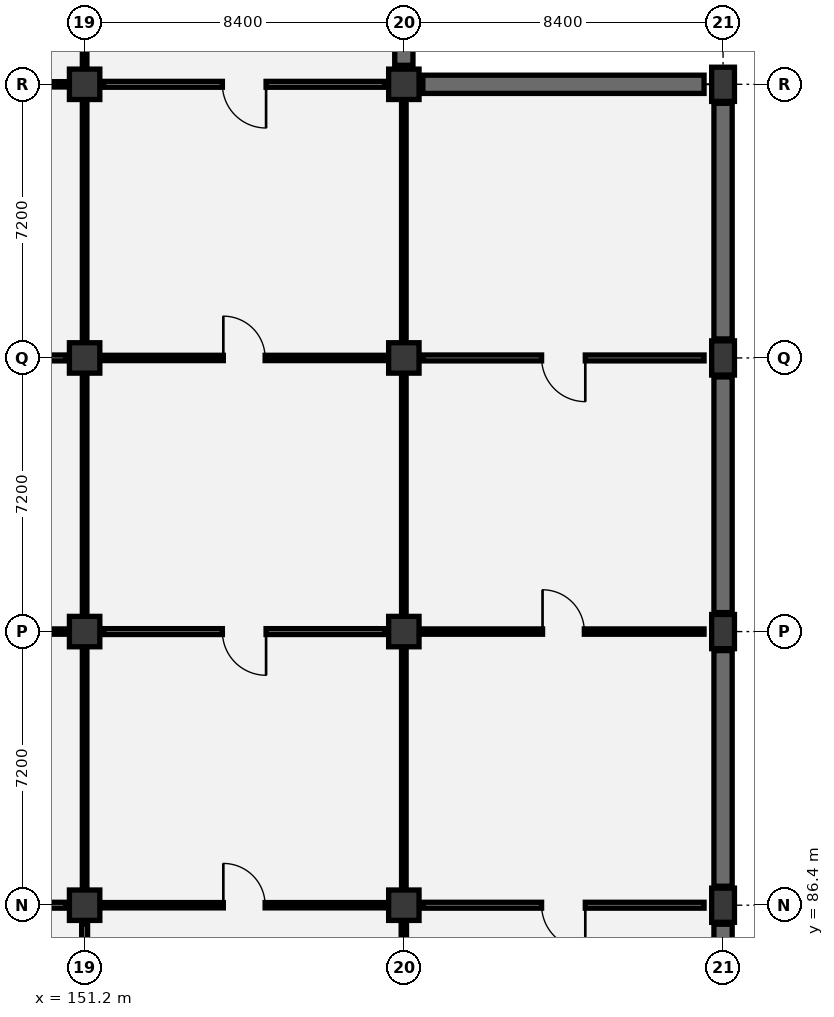
"""IFC4 building model, lengths in metres.
Left out: names, types, materials, properties, quantities, classifications, styles, units other than length and angle.
Written with IfcOpenShell. Run it as: python <this file> out.ifc"""

import sys

from ifc_helpers import new_model, si_unit, direction, frame, frame_2d, origin, origin_2d, place, context, subcontext, project, spatial, rectangle, extrude, element, fill, save


model = new_model("IFC4")
c1 = context("Model", 3, precision=1e-05, world=origin(), true_north=direction((0.0, 1.0)))
c2 = subcontext(c1, "Body", "Model", "MODEL_VIEW")
j1 = project(units=[si_unit("LENGTHUNIT", "METRE"), si_unit("PLANEANGLEUNIT", "RADIAN")], contexts=[c1])
p1 = place(None, origin())
s1 = spatial("IfcSite", under=j1, at=p1, CompositionType="ELEMENT")
p2 = place(p1, origin())
s2 = spatial("IfcBuilding", under=s1, at=p2, CompositionType="ELEMENT")
p3 = place(p2, frame((0.0, 0.0, -4.8)))
s3 = spatial("IfcBuildingStorey", under=s2, at=p3, CompositionType="ELEMENT", Elevation=-4.8)
for number, where, z_axis, x_axis in (
    (1, (151.2, 86.4, 0.0), (0.0, 0.0, 1.0), (1.0, 0.0, 0.0)),
    (2, (151.2, 93.6, 0.0), (0.0, 0.0, 1.0), (1.0, 0.0, 0.0)),
    (3, (151.2, 100.8, 0.0), (0.0, 0.0, 1.0), (1.0, 0.0, 0.0)),
    (4, (151.2, 108.0, 0.0), (0.0, 0.0, 1.0), (1.0, 0.0, 0.0)),
    (5, (159.6, 86.4, 0.0), (0.0, 0.0, 1.0), (1.0, 0.0, 0.0)),
    (6, (159.6, 93.6, 0.0), (0.0, 0.0, 1.0), (1.0, 0.0, 0.0)),
    (7, (159.6, 100.8, 0.0), (0.0, 0.0, 1.0), (1.0, 0.0, 0.0)),
    (8, (159.6, 108.0, 0.0), (0.0, 0.0, 1.0), (1.0, 0.0, 0.0)),
):
    element("IfcColumn", number, at=place(p3, frame(where, z_axis=z_axis, x_axis=x_axis)), inside=s3, PredefinedType="COLUMN", context=c2, shape_type="SweptSolid", body=[
        extrude(rectangle(XDim=0.8, YDim=0.8, at=origin_2d()), origin(), (0.0, 0.0, 1.0), 4.8),
    ])
for number, where, z_axis, x_axis in (
    (9, (168.0, 86.4, 0.0), (0.0, 0.0, 1.0), (1.0, 0.0, 0.0)),
    (10, (168.0, 93.6, 0.0), (0.0, 0.0, 1.0), (1.0, 0.0, 0.0)),
    (11, (168.0, 100.8, 0.0), (0.0, 0.0, 1.0), (1.0, 0.0, 0.0)),
    (12, (168.0, 108.0, 0.0), (0.0, 0.0, 1.0), (1.0, 0.0, 0.0)),
):
    element("IfcColumn", number, at=place(p3, frame(where, z_axis=z_axis, x_axis=x_axis)), inside=s3, PredefinedType="COLUMN", context=c2, shape_type="SweptSolid", body=[
        extrude(rectangle(XDim=0.6, YDim=0.9, at=origin_2d()), origin(), (0.0, 0.0, 1.0), 4.8),
    ])
for number, where, z_axis, x_axis in (
    (13, (159.6, 108.5, 0.0), (0.0, 0.0, 1.0), (0.0, 1.0, 0.0)),
    (14, (168.0, 79.7, 0.0), (0.0, 0.0, 1.0), (0.0, 1.0, 0.0)),
):
    element("IfcWall", number, at=place(p3, frame(where, z_axis=z_axis, x_axis=x_axis)), inside=s3, PredefinedType="USERDEFINED", context=c2, shape_type="SweptSolid", body=[
        extrude(rectangle(XDim=6.2, YDim=0.48, at=frame_2d((3.1, 0.0))), origin(), (0.0, 0.0, 1.0), 4.45),
    ])
p4 = place(p3, frame((168.0, 86.9, 0.0), z_axis=(0.0, 0.0, 1.0), x_axis=(0.0, 1.0, 0.0)))
e15 = element("IfcWall", 15, at=p4, inside=s3, PredefinedType="USERDEFINED", context=c2, shape_type="SweptSolid", body=[
    extrude(rectangle(XDim=6.2, YDim=0.48, at=frame_2d((3.1, 0.0))), origin(), (0.0, 0.0, 1.0), 4.45),
])
p5 = place(p3, frame((168.0, 94.1, 0.0), z_axis=(0.0, 0.0, 1.0), x_axis=(0.0, 1.0, 0.0)))
e16 = element("IfcWall", 16, at=p5, inside=s3, PredefinedType="USERDEFINED", context=c2, shape_type="SweptSolid", body=[
    extrude(rectangle(XDim=6.2, YDim=0.48, at=frame_2d((3.1, 0.0))), origin(), (0.0, 0.0, 1.0), 4.45),
])
p6 = place(p3, frame((160.1, 108.0, 0.0), z_axis=(0.0, 0.0, 1.0), x_axis=(1.0, 0.0, 0.0)))
e17 = element("IfcWall", 17, at=p6, inside=s3, PredefinedType="USERDEFINED", context=c2, shape_type="SweptSolid", body=[
    extrude(rectangle(XDim=7.4, YDim=0.48, at=frame_2d((3.7, 0.0))), origin(), (0.0, 0.0, 1.0), 4.45),
])
p7 = place(p3, frame((168.0, 101.3, 0.0), z_axis=(0.0, 0.0, 1.0), x_axis=(0.0, 1.0, 0.0)))
e18 = element("IfcWall", 18, at=p7, inside=s3, PredefinedType="USERDEFINED", context=c2, shape_type="SweptSolid", body=[
    extrude(rectangle(XDim=6.2, YDim=0.48, at=frame_2d((3.1, 0.0))), origin(), (0.0, 0.0, 1.0), 4.45),
])
p8 = place(p3, frame((168.0, 108.12, 0.0), z_axis=(0.0, 0.0, 1.0), x_axis=(0.0, 1.0, 0.0)))
e19 = element("IfcWall", 19, at=p8, inside=s3, PredefinedType="PARAPET", context=c2, shape_type="SweptSolid", body=[
    extrude(rectangle(XDim=6.96, YDim=0.22, at=frame_2d((3.48, 0.0))), origin(), (0.0, 0.0, 1.0), 1.15),
])
p9 = place(p3, frame((151.2, 79.7, 0.0), z_axis=(0.0, 0.0, 1.0), x_axis=(0.0, 1.0, 0.0)))
e20 = element("IfcWall", 20, at=p9, inside=s3, PredefinedType="PARTITIONING", context=c2, shape_type="SweptSolid", body=[
    extrude(rectangle(XDim=6.2, YDim=0.155, at=frame_2d((3.1, 0.0))), origin(), (0.0, 0.0, 1.0), 3.645),
])
p10 = place(p9, frame((2.525, 0.0, 0.0)))
e21 = element("IfcOpeningElement", 21, at=p10, cuts=e20, PredefinedType="OPENING", context=c2, shape_type="SweptSolid", body=[
    extrude(rectangle(XDim=1.15, YDim=2.1, at=frame_2d((0.575, 1.05))), frame((0.0, 0.087, 0.0), z_axis=(0.0, -1.0, 0.0), x_axis=(1.0, 0.0, 0.0)), (0.0, 0.0, 1.0), 0.175),
])
p11 = place(p3, frame((143.3, 86.4, 0.0), z_axis=(0.0, 0.0, 1.0), x_axis=(1.0, 0.0, 0.0)))
e22 = element("IfcWall", 22, at=p11, inside=s3, PredefinedType="PARTITIONING", context=c2, shape_type="SweptSolid", body=[
    extrude(rectangle(XDim=7.4, YDim=0.155, at=frame_2d((3.7, 0.0))), origin(), (0.0, 0.0, 1.0), 3.545),
])
p12 = place(p11, frame((3.15, 0.0, 0.0)))
e23 = element("IfcOpeningElement", 23, at=p12, cuts=e22, PredefinedType="OPENING", context=c2, shape_type="SweptSolid", body=[
    extrude(rectangle(XDim=1.1, YDim=2.1, at=frame_2d((0.55, 1.05))), frame((0.0, 0.087, 0.0), z_axis=(0.0, -1.0, 0.0), x_axis=(1.0, 0.0, 0.0)), (0.0, 0.0, 1.0), 0.175),
])
p13 = place(p3, frame((151.2, 86.9, 0.0), z_axis=(0.0, 0.0, 1.0), x_axis=(0.0, 1.0, 0.0)))
e24 = element("IfcWall", 24, at=p13, inside=s3, PredefinedType="PARTITIONING", context=c2, shape_type="SweptSolid", body=[
    extrude(rectangle(XDim=6.2, YDim=0.12, at=frame_2d((3.1, 0.0))), origin(), (0.0, 0.0, 1.0), 3.645),
])
p14 = place(p3, frame((143.3, 93.6, 0.0), z_axis=(0.0, 0.0, 1.0), x_axis=(1.0, 0.0, 0.0)))
e25 = element("IfcWall", 25, at=p14, inside=s3, PredefinedType="PARTITIONING", context=c2, shape_type="SweptSolid", body=[
    extrude(rectangle(XDim=7.4, YDim=0.14, at=frame_2d((3.7, 0.0))), origin(), (0.0, 0.0, 1.0), 3.545),
])
p15 = place(p14, frame((3.125, 0.0, 0.0)))
e26 = element("IfcOpeningElement", 26, at=p15, cuts=e25, PredefinedType="OPENING", context=c2, shape_type="SweptSolid", body=[
    extrude(rectangle(XDim=1.15, YDim=2.1, at=frame_2d((0.575, 1.05))), frame((0.0, 0.08, 0.0), z_axis=(0.0, -1.0, 0.0), x_axis=(1.0, 0.0, 0.0)), (0.0, 0.0, 1.0), 0.16),
])
p16 = place(p3, frame((151.2, 94.1, 0.0), z_axis=(0.0, 0.0, 1.0), x_axis=(0.0, 1.0, 0.0)))
e27 = element("IfcWall", 27, at=p16, inside=s3, PredefinedType="PARTITIONING", context=c2, shape_type="SweptSolid", body=[
    extrude(rectangle(XDim=6.2, YDim=0.12, at=frame_2d((3.1, 0.0))), origin(), (0.0, 0.0, 1.0), 3.645),
])
p17 = place(p3, frame((143.3, 100.8, 0.0), z_axis=(0.0, 0.0, 1.0), x_axis=(1.0, 0.0, 0.0)))
e28 = element("IfcWall", 28, at=p17, inside=s3, PredefinedType="PARTITIONING", context=c2, shape_type="SweptSolid", body=[
    extrude(rectangle(XDim=7.4, YDim=0.155, at=frame_2d((3.7, 0.0))), origin(), (0.0, 0.0, 1.0), 3.545),
])
p18 = place(p17, frame((3.15, 0.0, 0.0)))
e29 = element("IfcOpeningElement", 29, at=p18, cuts=e28, PredefinedType="OPENING", context=c2, shape_type="SweptSolid", body=[
    extrude(rectangle(XDim=1.1, YDim=2.1, at=frame_2d((0.55, 1.05))), frame((0.0, 0.087, 0.0), z_axis=(0.0, -1.0, 0.0), x_axis=(1.0, 0.0, 0.0)), (0.0, 0.0, 1.0), 0.175),
])
p19 = place(p3, frame((151.2, 101.3, 0.0), z_axis=(0.0, 0.0, 1.0), x_axis=(0.0, 1.0, 0.0)))
e30 = element("IfcWall", 30, at=p19, inside=s3, PredefinedType="PARTITIONING", context=c2, shape_type="SweptSolid", body=[
    extrude(rectangle(XDim=6.2, YDim=0.12, at=frame_2d((3.1, 0.0))), origin(), (0.0, 0.0, 1.0), 3.645),
])
p20 = place(p3, frame((143.3, 108.0, 0.0), z_axis=(0.0, 0.0, 1.0), x_axis=(1.0, 0.0, 0.0)))
e31 = element("IfcWall", 31, at=p20, inside=s3, PredefinedType="PARTITIONING", context=c2, shape_type="SweptSolid", body=[
    extrude(rectangle(XDim=7.4, YDim=0.14, at=frame_2d((3.7, 0.0))), origin(), (0.0, 0.0, 1.0), 3.545),
])
p21 = place(p20, frame((3.125, 0.0, 0.0)))
e32 = element("IfcOpeningElement", 32, at=p21, cuts=e31, PredefinedType="OPENING", context=c2, shape_type="SweptSolid", body=[
    extrude(rectangle(XDim=1.15, YDim=2.1, at=frame_2d((0.575, 1.05))), frame((0.0, 0.08, 0.0), z_axis=(0.0, -1.0, 0.0), x_axis=(1.0, 0.0, 0.0)), (0.0, 0.0, 1.0), 0.16),
])
p22 = place(p3, frame((151.2, 108.5, 0.0), z_axis=(0.0, 0.0, 1.0), x_axis=(0.0, 1.0, 0.0)))
e33 = element("IfcWall", 33, at=p22, inside=s3, PredefinedType="PARTITIONING", context=c2, shape_type="SweptSolid", body=[
    extrude(rectangle(XDim=6.2, YDim=0.12, at=frame_2d((3.1, 0.0))), origin(), (0.0, 0.0, 1.0), 3.645),
])
p23 = place(p3, frame((159.6, 79.7, 0.0), z_axis=(0.0, 0.0, 1.0), x_axis=(0.0, 1.0, 0.0)))
e34 = element("IfcWall", 34, at=p23, inside=s3, PredefinedType="PARTITIONING", context=c2, shape_type="SweptSolid", body=[
    extrude(rectangle(XDim=6.2, YDim=0.14, at=frame_2d((3.1, 0.0))), origin(), (0.0, 0.0, 1.0), 3.645),
])
p24 = place(p23, frame((2.525, 0.0, 0.0)))
e35 = element("IfcOpeningElement", 35, at=p24, cuts=e34, PredefinedType="OPENING", context=c2, shape_type="SweptSolid", body=[
    extrude(rectangle(XDim=1.15, YDim=2.1, at=frame_2d((0.575, 1.05))), frame((0.0, 0.08, 0.0), z_axis=(0.0, -1.0, 0.0), x_axis=(1.0, 0.0, 0.0)), (0.0, 0.0, 1.0), 0.16),
])
p25 = place(p3, frame((151.7, 86.4, 0.0), z_axis=(0.0, 0.0, 1.0), x_axis=(1.0, 0.0, 0.0)))
e36 = element("IfcWall", 36, at=p25, inside=s3, PredefinedType="PARTITIONING", context=c2, shape_type="SweptSolid", body=[
    extrude(rectangle(XDim=7.4, YDim=0.14, at=frame_2d((3.7, 0.0))), origin(), (0.0, 0.0, 1.0), 3.545),
])
p26 = place(p25, frame((3.15, 0.0, 0.0)))
e37 = element("IfcOpeningElement", 37, at=p26, cuts=e36, PredefinedType="OPENING", context=c2, shape_type="SweptSolid", body=[
    extrude(rectangle(XDim=1.1, YDim=2.1, at=frame_2d((0.55, 1.05))), frame((0.0, 0.08, 0.0), z_axis=(0.0, -1.0, 0.0), x_axis=(1.0, 0.0, 0.0)), (0.0, 0.0, 1.0), 0.16),
])
p27 = place(p3, frame((159.6, 86.9, 0.0), z_axis=(0.0, 0.0, 1.0), x_axis=(0.0, 1.0, 0.0)))
e38 = element("IfcWall", 38, at=p27, inside=s3, PredefinedType="PARTITIONING", context=c2, shape_type="SweptSolid", body=[
    extrude(rectangle(XDim=6.2, YDim=0.12, at=frame_2d((3.1, 0.0))), origin(), (0.0, 0.0, 1.0), 3.645),
])
p28 = place(p3, frame((151.7, 93.6, 0.0), z_axis=(0.0, 0.0, 1.0), x_axis=(1.0, 0.0, 0.0)))
e39 = element("IfcWall", 39, at=p28, inside=s3, PredefinedType="PARTITIONING", context=c2, shape_type="SweptSolid", body=[
    extrude(rectangle(XDim=7.4, YDim=0.155, at=frame_2d((3.7, 0.0))), origin(), (0.0, 0.0, 1.0), 3.545),
])
p29 = place(p28, frame((3.125, 0.0, 0.0)))
e40 = element("IfcOpeningElement", 40, at=p29, cuts=e39, PredefinedType="OPENING", context=c2, shape_type="SweptSolid", body=[
    extrude(rectangle(XDim=1.15, YDim=2.1, at=frame_2d((0.575, 1.05))), frame((0.0, 0.087, 0.0), z_axis=(0.0, -1.0, 0.0), x_axis=(1.0, 0.0, 0.0)), (0.0, 0.0, 1.0), 0.175),
])
p30 = place(p3, frame((159.6, 94.1, 0.0), z_axis=(0.0, 0.0, 1.0), x_axis=(0.0, 1.0, 0.0)))
e41 = element("IfcWall", 41, at=p30, inside=s3, PredefinedType="PARTITIONING", context=c2, shape_type="SweptSolid", body=[
    extrude(rectangle(XDim=6.2, YDim=0.12, at=frame_2d((3.1, 0.0))), origin(), (0.0, 0.0, 1.0), 3.645),
])
p31 = place(p3, frame((151.7, 100.8, 0.0), z_axis=(0.0, 0.0, 1.0), x_axis=(1.0, 0.0, 0.0)))
e42 = element("IfcWall", 42, at=p31, inside=s3, PredefinedType="PARTITIONING", context=c2, shape_type="SweptSolid", body=[
    extrude(rectangle(XDim=7.4, YDim=0.14, at=frame_2d((3.7, 0.0))), origin(), (0.0, 0.0, 1.0), 3.545),
])
p32 = place(p31, frame((3.15, 0.0, 0.0)))
e43 = element("IfcOpeningElement", 43, at=p32, cuts=e42, PredefinedType="OPENING", context=c2, shape_type="SweptSolid", body=[
    extrude(rectangle(XDim=1.1, YDim=2.1, at=frame_2d((0.55, 1.05))), frame((0.0, 0.08, 0.0), z_axis=(0.0, -1.0, 0.0), x_axis=(1.0, 0.0, 0.0)), (0.0, 0.0, 1.0), 0.16),
])
p33 = place(p3, frame((159.6, 101.3, 0.0), z_axis=(0.0, 0.0, 1.0), x_axis=(0.0, 1.0, 0.0)))
e44 = element("IfcWall", 44, at=p33, inside=s3, PredefinedType="PARTITIONING", context=c2, shape_type="SweptSolid", body=[
    extrude(rectangle(XDim=6.2, YDim=0.12, at=frame_2d((3.1, 0.0))), origin(), (0.0, 0.0, 1.0), 3.645),
])
p34 = place(p3, frame((151.7, 108.0, 0.0), z_axis=(0.0, 0.0, 1.0), x_axis=(1.0, 0.0, 0.0)))
e45 = element("IfcWall", 45, at=p34, inside=s3, PredefinedType="PARTITIONING", context=c2, shape_type="SweptSolid", body=[
    extrude(rectangle(XDim=7.4, YDim=0.155, at=frame_2d((3.7, 0.0))), origin(), (0.0, 0.0, 1.0), 3.545),
])
p35 = place(p34, frame((3.125, 0.0, 0.0)))
e46 = element("IfcOpeningElement", 46, at=p35, cuts=e45, PredefinedType="OPENING", context=c2, shape_type="SweptSolid", body=[
    extrude(rectangle(XDim=1.15, YDim=2.1, at=frame_2d((0.575, 1.05))), frame((0.0, 0.087, 0.0), z_axis=(0.0, -1.0, 0.0), x_axis=(1.0, 0.0, 0.0)), (0.0, 0.0, 1.0), 0.175),
])
p36 = place(p3, frame((160.1, 86.4, 0.0), z_axis=(0.0, 0.0, 1.0), x_axis=(1.0, 0.0, 0.0)))
e47 = element("IfcWall", 47, at=p36, inside=s3, PredefinedType="PARTITIONING", context=c2, shape_type="SweptSolid", body=[
    extrude(rectangle(XDim=7.4, YDim=0.155, at=frame_2d((3.7, 0.0))), origin(), (0.0, 0.0, 1.0), 3.545),
])
p37 = place(p36, frame((3.125, 0.0, 0.0)))
e48 = element("IfcOpeningElement", 48, at=p37, cuts=e47, PredefinedType="OPENING", context=c2, shape_type="SweptSolid", body=[
    extrude(rectangle(XDim=1.15, YDim=2.1, at=frame_2d((0.575, 1.05))), frame((0.0, 0.087, 0.0), z_axis=(0.0, -1.0, 0.0), x_axis=(1.0, 0.0, 0.0)), (0.0, 0.0, 1.0), 0.175),
])
p38 = place(p3, frame((160.1, 93.6, 0.0), z_axis=(0.0, 0.0, 1.0), x_axis=(1.0, 0.0, 0.0)))
e49 = element("IfcWall", 49, at=p38, inside=s3, PredefinedType="PARTITIONING", context=c2, shape_type="SweptSolid", body=[
    extrude(rectangle(XDim=7.4, YDim=0.14, at=frame_2d((3.7, 0.0))), origin(), (0.0, 0.0, 1.0), 3.545),
])
p39 = place(p38, frame((3.15, 0.0, 0.0)))
e50 = element("IfcOpeningElement", 50, at=p39, cuts=e49, PredefinedType="OPENING", context=c2, shape_type="SweptSolid", body=[
    extrude(rectangle(XDim=1.1, YDim=2.1, at=frame_2d((0.55, 1.05))), frame((0.0, 0.08, 0.0), z_axis=(0.0, -1.0, 0.0), x_axis=(1.0, 0.0, 0.0)), (0.0, 0.0, 1.0), 0.16),
])
p40 = place(p3, frame((160.1, 100.8, 0.0), z_axis=(0.0, 0.0, 1.0), x_axis=(1.0, 0.0, 0.0)))
e51 = element("IfcWall", 51, at=p40, inside=s3, PredefinedType="PARTITIONING", context=c2, shape_type="SweptSolid", body=[
    extrude(rectangle(XDim=7.4, YDim=0.155, at=frame_2d((3.7, 0.0))), origin(), (0.0, 0.0, 1.0), 3.545),
])
p41 = place(p40, frame((3.125, 0.0, 0.0)))
e52 = element("IfcOpeningElement", 52, at=p41, cuts=e51, PredefinedType="OPENING", context=c2, shape_type="SweptSolid", body=[
    extrude(rectangle(XDim=1.15, YDim=2.1, at=frame_2d((0.575, 1.05))), frame((0.0, 0.087, 0.0), z_axis=(0.0, -1.0, 0.0), x_axis=(1.0, 0.0, 0.0)), (0.0, 0.0, 1.0), 0.175),
])
p42 = place(p26, origin())
e53 = element("IfcDoor", 53, at=p42, inside=s3, OperationType="SINGLE_SWING_LEFT", PredefinedType="DOOR", context=c2, shape_type="SweptSolid", body=[
    extrude(rectangle(XDim=1.1, YDim=2.1, at=frame_2d((0.55, 1.05))), frame((0.0, 0.025, 0.0), z_axis=(0.0, -1.0, 0.0), x_axis=(1.0, 0.0, 0.0)), (0.0, 0.0, 1.0), 0.05),
])
fill(e37, e53)
p43 = place(p29, frame((1.15, 0.0, 0.0), z_axis=(0.0, 0.0, 1.0), x_axis=(-1.0, 0.0, 0.0)))
e54 = element("IfcDoor", 54, at=p43, inside=s3, OperationType="SINGLE_SWING_LEFT", PredefinedType="DOOR", context=c2, shape_type="SweptSolid", body=[
    extrude(rectangle(XDim=1.15, YDim=2.1, at=frame_2d((0.575, 1.05))), frame((0.0, 0.025, 0.0), z_axis=(0.0, -1.0, 0.0), x_axis=(1.0, 0.0, 0.0)), (0.0, 0.0, 1.0), 0.05),
])
fill(e40, e54)
p44 = place(p32, origin())
e55 = element("IfcDoor", 55, at=p44, inside=s3, OperationType="SINGLE_SWING_LEFT", PredefinedType="DOOR", context=c2, shape_type="SweptSolid", body=[
    extrude(rectangle(XDim=1.1, YDim=2.1, at=frame_2d((0.55, 1.05))), frame((0.0, 0.025, 0.0), z_axis=(0.0, -1.0, 0.0), x_axis=(1.0, 0.0, 0.0)), (0.0, 0.0, 1.0), 0.05),
])
fill(e43, e55)
p45 = place(p35, frame((1.15, 0.0, 0.0), z_axis=(0.0, 0.0, 1.0), x_axis=(-1.0, 0.0, 0.0)))
e56 = element("IfcDoor", 56, at=p45, inside=s3, OperationType="SINGLE_SWING_LEFT", PredefinedType="DOOR", context=c2, shape_type="SweptSolid", body=[
    extrude(rectangle(XDim=1.15, YDim=2.1, at=frame_2d((0.575, 1.05))), frame((0.0, 0.025, 0.0), z_axis=(0.0, -1.0, 0.0), x_axis=(1.0, 0.0, 0.0)), (0.0, 0.0, 1.0), 0.05),
])
fill(e46, e56)
p46 = place(p37, frame((1.15, 0.0, 0.0), z_axis=(0.0, 0.0, 1.0), x_axis=(-1.0, 0.0, 0.0)))
e57 = element("IfcDoor", 57, at=p46, inside=s3, OperationType="SINGLE_SWING_LEFT", PredefinedType="DOOR", context=c2, shape_type="SweptSolid", body=[
    extrude(rectangle(XDim=1.15, YDim=2.1, at=frame_2d((0.575, 1.05))), frame((0.0, 0.025, 0.0), z_axis=(0.0, -1.0, 0.0), x_axis=(1.0, 0.0, 0.0)), (0.0, 0.0, 1.0), 0.05),
])
fill(e48, e57)
p47 = place(p39, origin())
e58 = element("IfcDoor", 58, at=p47, inside=s3, OperationType="SINGLE_SWING_LEFT", PredefinedType="DOOR", context=c2, shape_type="SweptSolid", body=[
    extrude(rectangle(XDim=1.1, YDim=2.1, at=frame_2d((0.55, 1.05))), frame((0.0, 0.025, 0.0), z_axis=(0.0, -1.0, 0.0), x_axis=(1.0, 0.0, 0.0)), (0.0, 0.0, 1.0), 0.05),
])
fill(e50, e58)
p48 = place(p41, frame((1.15, 0.0, 0.0), z_axis=(0.0, 0.0, 1.0), x_axis=(-1.0, 0.0, 0.0)))
e59 = element("IfcDoor", 59, at=p48, inside=s3, OperationType="SINGLE_SWING_LEFT", PredefinedType="DOOR", context=c2, shape_type="SweptSolid", body=[
    extrude(rectangle(XDim=1.15, YDim=2.1, at=frame_2d((0.575, 1.05))), frame((0.0, 0.025, 0.0), z_axis=(0.0, -1.0, 0.0), x_axis=(1.0, 0.0, 0.0)), (0.0, 0.0, 1.0), 0.05),
])
fill(e52, e59)
save(model, sys.argv[1])
